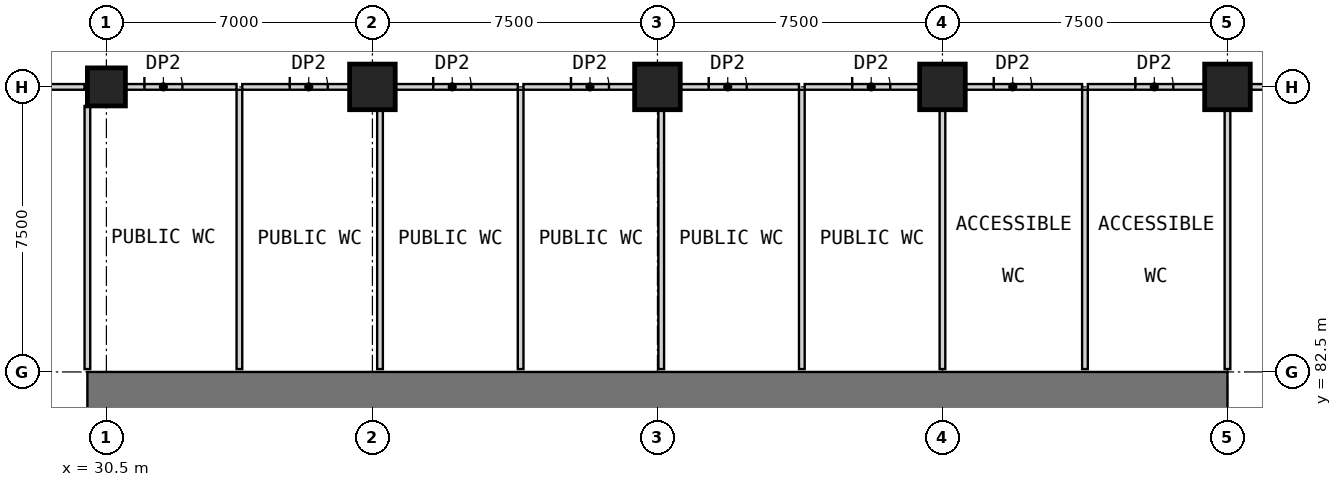
"""IFC4 building model, lengths in metres.
Left out: names, types, materials, properties, quantities, classifications, styles, units other than length and angle.
Written with IfcOpenShell. Run it as: python <this file> out.ifc"""

import sys

from ifc_helpers import new_model, si_unit, direction, frame, frame_2d, origin, origin_2d, place, context, subcontext, project, spatial, rectangle, extrude, element, fill, save


model = new_model("IFC4")
c1 = context("Model", 3, precision=1e-05, world=origin(), true_north=direction((0.0, 1.0)))
c2 = subcontext(c1, "Body", "Model", "MODEL_VIEW")
j1 = project(units=[si_unit("LENGTHUNIT", "METRE"), si_unit("PLANEANGLEUNIT", "RADIAN")], contexts=[c1])
p1 = place(None, origin())
s1 = spatial("IfcSite", under=j1, at=p1, CompositionType="ELEMENT")
p2 = place(p1, origin())
s2 = spatial("IfcBuilding", under=s1, at=p2, CompositionType="ELEMENT")
p3 = place(p2, frame((0.0, 0.0, 23.5)))
s3 = spatial("IfcBuildingStorey", under=s2, at=p3, CompositionType="ELEMENT", Elevation=23.5)
p4 = place(p3, frame((30.5, 90.0, 0.0), z_axis=(0.0, 0.0, 1.0), x_axis=(1.0, 0.0, 0.0)))
e1 = element("IfcColumn", 1, at=p4, inside=s3, PredefinedType="COLUMN", context=c2, shape_type="SweptSolid", body=[
    extrude(rectangle(XDim=1.0, YDim=1.0, at=origin_2d()), origin(), (0.0, 0.0, 1.0), 5.5),
])
for number, where, z_axis, x_axis in (
    (2, (37.5, 90.0, 0.0), (0.0, 0.0, 1.0), (1.0, 0.0, 0.0)),
    (3, (45.0, 90.0, 0.0), (0.0, 0.0, 1.0), (1.0, 0.0, 0.0)),
    (4, (52.5, 90.0, 0.0), (0.0, 0.0, 1.0), (1.0, 0.0, 0.0)),
    (5, (60.0, 90.0, 0.0), (0.0, 0.0, 1.0), (1.0, 0.0, 0.0)),
):
    element("IfcColumn", number, at=place(p3, frame(where, z_axis=z_axis, x_axis=x_axis)), inside=s3, PredefinedType="COLUMN", context=c2, shape_type="SweptSolid", body=[
        extrude(rectangle(XDim=1.2, YDim=1.2, at=origin_2d()), origin(), (0.0, 0.0, 1.0), 5.5),
    ])
p5 = place(p3, frame((30.0, 82.0, 0.0), z_axis=(0.0, 0.0, 1.0), x_axis=(1.0, 0.0, 0.0)))
e6 = element("IfcWall", 6, at=p5, inside=s3, PredefinedType="SHEAR", context=c2, shape_type="SweptSolid", body=[
    extrude(rectangle(XDim=30.0, YDim=1.0, at=frame_2d((15.0, 0.0))), origin(), (0.0, 0.0, 1.0), 5.5),
])
p6 = place(p3, frame((23.6, 90.0, 0.0), z_axis=(0.0, 0.0, 1.0), x_axis=(1.0, 0.0, 0.0)))
e7 = element("IfcWall", 7, at=p6, inside=s3, PredefinedType="PARTITIONING", context=c2, shape_type="SweptSolid", body=[
    extrude(rectangle(XDim=6.325, YDim=0.15, at=frame_2d((3.163, 0.0))), origin(), (0.0, 0.0, 1.0), 5.2),
])
p7 = place(p3, frame((31.0, 90.0, 0.0), z_axis=(0.0, 0.0, 1.0), x_axis=(1.0, 0.0, 0.0)))
e8 = element("IfcWall", 8, at=p7, inside=s3, PredefinedType="PARTITIONING", context=c2, shape_type="SweptSolid", body=[
    extrude(rectangle(XDim=2.925, YDim=0.15, at=frame_2d((1.462, 0.0))), origin(), (0.0, 0.0, 1.0), 5.2),
])
p8 = place(p7, frame((0.5, 0.0, 0.0)))
e9 = element("IfcOpeningElement", 9, at=p8, cuts=e8, PredefinedType="OPENING", context=c2, shape_type="SweptSolid", body=[
    extrude(rectangle(XDim=1.0, YDim=2.1, at=frame_2d((0.5, 1.05))), frame((0.0, 0.085, 0.0), z_axis=(0.0, -1.0, 0.0), x_axis=(1.0, 0.0, 0.0)), (0.0, 0.0, 1.0), 0.17),
])
p9 = place(p3, frame((34.075, 90.0, 0.0), z_axis=(0.0, 0.0, 1.0), x_axis=(1.0, 0.0, 0.0)))
e10 = element("IfcWall", 10, at=p9, inside=s3, PredefinedType="PARTITIONING", context=c2, shape_type="SweptSolid", body=[
    extrude(rectangle(XDim=2.825, YDim=0.15, at=frame_2d((1.413, 0.0))), origin(), (0.0, 0.0, 1.0), 5.2),
])
p10 = place(p9, frame((1.25, 0.0, 0.0)))
e11 = element("IfcOpeningElement", 11, at=p10, cuts=e10, PredefinedType="OPENING", context=c2, shape_type="SweptSolid", body=[
    extrude(rectangle(XDim=1.0, YDim=2.1, at=frame_2d((0.5, 1.05))), frame((0.0, 0.085, 0.0), z_axis=(0.0, -1.0, 0.0), x_axis=(1.0, 0.0, 0.0)), (0.0, 0.0, 1.0), 0.17),
])
p11 = place(p3, frame((38.1, 90.0, 0.0), z_axis=(0.0, 0.0, 1.0), x_axis=(1.0, 0.0, 0.0)))
e12 = element("IfcWall", 12, at=p11, inside=s3, PredefinedType="PARTITIONING", context=c2, shape_type="SweptSolid", body=[
    extrude(rectangle(XDim=3.225, YDim=0.15, at=frame_2d((1.612, 0.0))), origin(), (0.0, 0.0, 1.0), 5.2),
])
p12 = place(p11, frame((1.0, 0.0, 0.0)))
e13 = element("IfcOpeningElement", 13, at=p12, cuts=e12, PredefinedType="OPENING", context=c2, shape_type="SweptSolid", body=[
    extrude(rectangle(XDim=1.0, YDim=2.1, at=frame_2d((0.5, 1.05))), frame((0.0, 0.085, 0.0), z_axis=(0.0, -1.0, 0.0), x_axis=(1.0, 0.0, 0.0)), (0.0, 0.0, 1.0), 0.17),
])
p13 = place(p3, frame((41.475, 90.0, 0.0), z_axis=(0.0, 0.0, 1.0), x_axis=(1.0, 0.0, 0.0)))
e14 = element("IfcWall", 14, at=p13, inside=s3, PredefinedType="PARTITIONING", context=c2, shape_type="SweptSolid", body=[
    extrude(rectangle(XDim=2.925, YDim=0.15, at=frame_2d((1.462, 0.0))), origin(), (0.0, 0.0, 1.0), 5.2),
])
p14 = place(p13, frame((1.25, 0.0, 0.0)))
e15 = element("IfcOpeningElement", 15, at=p14, cuts=e14, PredefinedType="OPENING", context=c2, shape_type="SweptSolid", body=[
    extrude(rectangle(XDim=1.0, YDim=2.1, at=frame_2d((0.5, 1.05))), frame((0.0, 0.085, 0.0), z_axis=(0.0, -1.0, 0.0), x_axis=(1.0, 0.0, 0.0)), (0.0, 0.0, 1.0), 0.17),
])
p15 = place(p3, frame((45.6, 90.0, 0.0), z_axis=(0.0, 0.0, 1.0), x_axis=(1.0, 0.0, 0.0)))
e16 = element("IfcWall", 16, at=p15, inside=s3, PredefinedType="PARTITIONING", context=c2, shape_type="SweptSolid", body=[
    extrude(rectangle(XDim=3.125, YDim=0.15, at=frame_2d((1.562, 0.0))), origin(), (0.0, 0.0, 1.0), 5.2),
])
p16 = place(p15, frame((0.75, 0.0, 0.0)))
e17 = element("IfcOpeningElement", 17, at=p16, cuts=e16, PredefinedType="OPENING", context=c2, shape_type="SweptSolid", body=[
    extrude(rectangle(XDim=1.0, YDim=2.1, at=frame_2d((0.5, 1.05))), frame((0.0, 0.085, 0.0), z_axis=(0.0, -1.0, 0.0), x_axis=(1.0, 0.0, 0.0)), (0.0, 0.0, 1.0), 0.17),
])
p17 = place(p3, frame((48.875, 90.0, 0.0), z_axis=(0.0, 0.0, 1.0), x_axis=(1.0, 0.0, 0.0)))
e18 = element("IfcWall", 18, at=p17, inside=s3, PredefinedType="PARTITIONING", context=c2, shape_type="SweptSolid", body=[
    extrude(rectangle(XDim=3.025, YDim=0.15, at=frame_2d((1.512, 0.0))), origin(), (0.0, 0.0, 1.0), 5.2),
])
p18 = place(p17, frame((1.25, 0.0, 0.0)))
e19 = element("IfcOpeningElement", 19, at=p18, cuts=e18, PredefinedType="OPENING", context=c2, shape_type="SweptSolid", body=[
    extrude(rectangle(XDim=1.0, YDim=2.1, at=frame_2d((0.5, 1.05))), frame((0.0, 0.085, 0.0), z_axis=(0.0, -1.0, 0.0), x_axis=(1.0, 0.0, 0.0)), (0.0, 0.0, 1.0), 0.17),
])
p19 = place(p3, frame((53.1, 90.0, 0.0), z_axis=(0.0, 0.0, 1.0), x_axis=(1.0, 0.0, 0.0)))
e20 = element("IfcWall", 20, at=p19, inside=s3, PredefinedType="PARTITIONING", context=c2, shape_type="SweptSolid", body=[
    extrude(rectangle(XDim=3.075, YDim=0.15, at=frame_2d((1.538, 0.0))), origin(), (0.0, 0.0, 1.0), 5.2),
])
p20 = place(p19, frame((0.75, 0.0, 0.0)))
e21 = element("IfcOpeningElement", 21, at=p20, cuts=e20, PredefinedType="OPENING", context=c2, shape_type="SweptSolid", body=[
    extrude(rectangle(XDim=1.0, YDim=2.1, at=frame_2d((0.5, 1.05))), frame((0.0, 0.085, 0.0), z_axis=(0.0, -1.0, 0.0), x_axis=(1.0, 0.0, 0.0)), (0.0, 0.0, 1.0), 0.17),
])
p21 = place(p3, frame((56.325, 90.0, 0.0), z_axis=(0.0, 0.0, 1.0), x_axis=(1.0, 0.0, 0.0)))
e22 = element("IfcWall", 22, at=p21, inside=s3, PredefinedType="PARTITIONING", context=c2, shape_type="SweptSolid", body=[
    extrude(rectangle(XDim=3.075, YDim=0.15, at=frame_2d((1.538, 0.0))), origin(), (0.0, 0.0, 1.0), 5.2),
])
p22 = place(p21, frame((1.25, 0.0, 0.0)))
e23 = element("IfcOpeningElement", 23, at=p22, cuts=e22, PredefinedType="OPENING", context=c2, shape_type="SweptSolid", body=[
    extrude(rectangle(XDim=1.0, YDim=2.1, at=frame_2d((0.5, 1.05))), frame((0.0, 0.085, 0.0), z_axis=(0.0, -1.0, 0.0), x_axis=(1.0, 0.0, 0.0)), (0.0, 0.0, 1.0), 0.17),
])
p23 = place(p3, frame((60.6, 90.0, 0.0), z_axis=(0.0, 0.0, 1.0), x_axis=(1.0, 0.0, 0.0)))
e24 = element("IfcWall", 24, at=p23, inside=s3, PredefinedType="PARTITIONING", context=c2, shape_type="SweptSolid", body=[
    extrude(rectangle(XDim=6.3, YDim=0.15, at=frame_2d((3.15, 0.0))), origin(), (0.0, 0.0, 1.0), 5.2),
])
p24 = place(p23, frame((3.5, 0.0, 0.0)))
e25 = element("IfcOpeningElement", 25, at=p24, cuts=e24, PredefinedType="OPENING", context=c2, shape_type="SweptSolid", body=[
    extrude(rectangle(XDim=1.8, YDim=2.4, at=frame_2d((0.9, 1.2))), frame((0.0, 0.085, 0.0), z_axis=(0.0, -1.0, 0.0), x_axis=(1.0, 0.0, 0.0)), (0.0, 0.0, 1.0), 0.17),
])
p25 = place(p3, frame((34.0, 82.575, 0.0), z_axis=(0.0, 0.0, 1.0), x_axis=(0.0, 1.0, 0.0)))
e26 = element("IfcWall", 26, at=p25, inside=s3, PredefinedType="PARTITIONING", context=c2, shape_type="SweptSolid", body=[
    extrude(rectangle(XDim=7.35, YDim=0.15, at=frame_2d((3.675, 0.0))), origin(), (0.0, 0.0, 1.0), 5.2),
])
p26 = place(p3, frame((52.5, 82.575, 0.0), z_axis=(0.0, 0.0, 1.0), x_axis=(0.0, 1.0, 0.0)))
e27 = element("IfcWall", 27, at=p26, inside=s3, PredefinedType="PARTITIONING", context=c2, shape_type="SweptSolid", body=[
    extrude(rectangle(XDim=6.825, YDim=0.15, at=frame_2d((3.413, 0.0))), origin(), (0.0, 0.0, 1.0), 5.2),
])
p27 = place(p3, frame((56.25, 82.575, 0.0), z_axis=(0.0, 0.0, 1.0), x_axis=(0.0, 1.0, 0.0)))
e28 = element("IfcWall", 28, at=p27, inside=s3, PredefinedType="PARTITIONING", context=c2, shape_type="SweptSolid", body=[
    extrude(rectangle(XDim=7.35, YDim=0.15, at=frame_2d((3.675, 0.0))), origin(), (0.0, 0.0, 1.0), 5.2),
])
p28 = place(p3, frame((30.0, 82.575, 0.0), z_axis=(0.0, 0.0, 1.0), x_axis=(0.0, 1.0, 0.0)))
e29 = element("IfcWall", 29, at=p28, inside=s3, PredefinedType="PARTITIONING", context=c2, shape_type="SweptSolid", body=[
    extrude(rectangle(XDim=6.925, YDim=0.15, at=frame_2d((3.462, 0.0))), origin(), (0.0, 0.0, 1.0), 5.2),
])
p29 = place(p3, frame((37.7, 82.575, 0.0), z_axis=(0.0, 0.0, 1.0), x_axis=(0.0, 1.0, 0.0)))
e30 = element("IfcWall", 30, at=p29, inside=s3, PredefinedType="PARTITIONING", context=c2, shape_type="SweptSolid", body=[
    extrude(rectangle(XDim=6.825, YDim=0.15, at=frame_2d((3.413, 0.0))), origin(), (0.0, 0.0, 1.0), 5.2),
])
p30 = place(p3, frame((41.4, 82.575, 0.0), z_axis=(0.0, 0.0, 1.0), x_axis=(0.0, 1.0, 0.0)))
e31 = element("IfcWall", 31, at=p30, inside=s3, PredefinedType="PARTITIONING", context=c2, shape_type="SweptSolid", body=[
    extrude(rectangle(XDim=7.35, YDim=0.15, at=frame_2d((3.675, 0.0))), origin(), (0.0, 0.0, 1.0), 5.2),
])
p31 = place(p3, frame((45.1, 82.575, 0.0), z_axis=(0.0, 0.0, 1.0), x_axis=(0.0, 1.0, 0.0)))
e32 = element("IfcWall", 32, at=p31, inside=s3, PredefinedType="PARTITIONING", context=c2, shape_type="SweptSolid", body=[
    extrude(rectangle(XDim=6.825, YDim=0.15, at=frame_2d((3.413, 0.0))), origin(), (0.0, 0.0, 1.0), 5.2),
])
p32 = place(p3, frame((48.8, 82.575, 0.0), z_axis=(0.0, 0.0, 1.0), x_axis=(0.0, 1.0, 0.0)))
e33 = element("IfcWall", 33, at=p32, inside=s3, PredefinedType="PARTITIONING", context=c2, shape_type="SweptSolid", body=[
    extrude(rectangle(XDim=7.35, YDim=0.15, at=frame_2d((3.675, 0.0))), origin(), (0.0, 0.0, 1.0), 5.2),
])
p33 = place(p3, frame((60.0, 82.575, 0.0), z_axis=(0.0, 0.0, 1.0), x_axis=(0.0, 1.0, 0.0)))
e34 = element("IfcWall", 34, at=p33, inside=s3, PredefinedType="PARTITIONING", context=c2, shape_type="SweptSolid", body=[
    extrude(rectangle(XDim=6.825, YDim=0.15, at=frame_2d((3.413, 0.0))), origin(), (0.0, 0.0, 1.0), 5.2),
])
p34 = place(p8, origin())
e35 = element("IfcDoor", 35, at=p34, inside=s3, OperationType="SINGLE_SWING_LEFT", PredefinedType="DOOR", context=c2, shape_type="SweptSolid", body=[
    extrude(rectangle(XDim=1.0, YDim=2.1, at=frame_2d((0.5, 1.05))), frame((0.0, 0.025, 0.0), z_axis=(0.0, -1.0, 0.0), x_axis=(1.0, 0.0, 0.0)), (0.0, 0.0, 1.0), 0.05),
])
fill(e9, e35)
p35 = place(p10, origin())
e36 = element("IfcDoor", 36, at=p35, inside=s3, OperationType="SINGLE_SWING_LEFT", PredefinedType="DOOR", context=c2, shape_type="SweptSolid", body=[
    extrude(rectangle(XDim=1.0, YDim=2.1, at=frame_2d((0.5, 1.05))), frame((0.0, 0.025, 0.0), z_axis=(0.0, -1.0, 0.0), x_axis=(1.0, 0.0, 0.0)), (0.0, 0.0, 1.0), 0.05),
])
fill(e11, e36)
p36 = place(p12, origin())
e37 = element("IfcDoor", 37, at=p36, inside=s3, OperationType="SINGLE_SWING_LEFT", PredefinedType="DOOR", context=c2, shape_type="SweptSolid", body=[
    extrude(rectangle(XDim=1.0, YDim=2.1, at=frame_2d((0.5, 1.05))), frame((0.0, 0.025, 0.0), z_axis=(0.0, -1.0, 0.0), x_axis=(1.0, 0.0, 0.0)), (0.0, 0.0, 1.0), 0.05),
])
fill(e13, e37)
p37 = place(p14, origin())
e38 = element("IfcDoor", 38, at=p37, inside=s3, OperationType="SINGLE_SWING_LEFT", PredefinedType="DOOR", context=c2, shape_type="SweptSolid", body=[
    extrude(rectangle(XDim=1.0, YDim=2.1, at=frame_2d((0.5, 1.05))), frame((0.0, 0.025, 0.0), z_axis=(0.0, -1.0, 0.0), x_axis=(1.0, 0.0, 0.0)), (0.0, 0.0, 1.0), 0.05),
])
fill(e15, e38)
p38 = place(p16, origin())
e39 = element("IfcDoor", 39, at=p38, inside=s3, OperationType="SINGLE_SWING_LEFT", PredefinedType="DOOR", context=c2, shape_type="SweptSolid", body=[
    extrude(rectangle(XDim=1.0, YDim=2.1, at=frame_2d((0.5, 1.05))), frame((0.0, 0.025, 0.0), z_axis=(0.0, -1.0, 0.0), x_axis=(1.0, 0.0, 0.0)), (0.0, 0.0, 1.0), 0.05),
])
fill(e17, e39)
p39 = place(p18, origin())
e40 = element("IfcDoor", 40, at=p39, inside=s3, OperationType="SINGLE_SWING_LEFT", PredefinedType="DOOR", context=c2, shape_type="SweptSolid", body=[
    extrude(rectangle(XDim=1.0, YDim=2.1, at=frame_2d((0.5, 1.05))), frame((0.0, 0.025, 0.0), z_axis=(0.0, -1.0, 0.0), x_axis=(1.0, 0.0, 0.0)), (0.0, 0.0, 1.0), 0.05),
])
fill(e19, e40)
p40 = place(p20, origin())
e41 = element("IfcDoor", 41, at=p40, inside=s3, OperationType="SINGLE_SWING_LEFT", PredefinedType="DOOR", context=c2, shape_type="SweptSolid", body=[
    extrude(rectangle(XDim=1.0, YDim=2.1, at=frame_2d((0.5, 1.05))), frame((0.0, 0.025, 0.0), z_axis=(0.0, -1.0, 0.0), x_axis=(1.0, 0.0, 0.0)), (0.0, 0.0, 1.0), 0.05),
])
fill(e21, e41)
p41 = place(p22, origin())
e42 = element("IfcDoor", 42, at=p41, inside=s3, OperationType="SINGLE_SWING_LEFT", PredefinedType="DOOR", context=c2, shape_type="SweptSolid", body=[
    extrude(rectangle(XDim=1.0, YDim=2.1, at=frame_2d((0.5, 1.05))), frame((0.0, 0.025, 0.0), z_axis=(0.0, -1.0, 0.0), x_axis=(1.0, 0.0, 0.0)), (0.0, 0.0, 1.0), 0.05),
])
fill(e23, e42)
save(model, sys.argv[1])
